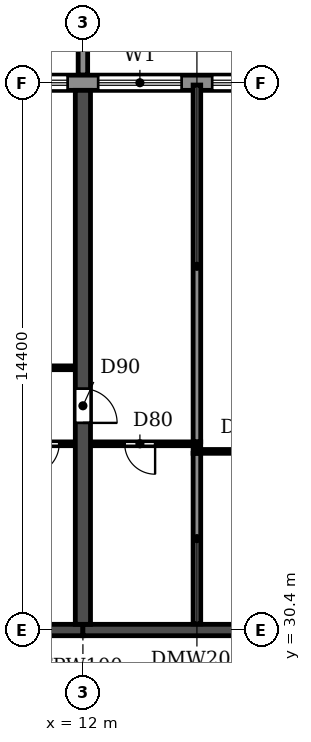
"""IFC4 building model, lengths in metres.
Left out: names, types, materials, properties, quantities, classifications, styles, units other than length and angle.
Written with IfcOpenShell. Run it as: python <this file> out.ifc"""

import sys

from ifc_helpers import new_model, si_unit, direction, frame, frame_2d, origin, place, context, subcontext, project, spatial, polyline, rectangle, outline, extrude, source, transform, mapped, element, fill, save


model = new_model("IFC4")
c1 = context("Model", 3, precision=1e-05, world=origin(), true_north=direction((0.0, 1.0)))
c2 = subcontext(c1, "Body", "Model", "MODEL_VIEW")
j1 = project(units=[si_unit("LENGTHUNIT", "METRE"), si_unit("PLANEANGLEUNIT", "RADIAN")], contexts=[c1])
p1 = place(None, origin())
s1 = spatial("IfcSite", under=j1, at=p1, CompositionType="ELEMENT")
p2 = place(p1, origin())
s2 = spatial("IfcBuilding", under=s1, at=p2, CompositionType="ELEMENT")
p3 = place(p2, frame((0.0, 0.0, 49.8)))
s3 = spatial("IfcBuildingStorey", under=s2, at=p3, CompositionType="ELEMENT", Elevation=49.8)
p4 = place(p3, frame((12.0, 30.55, 0.0), z_axis=(0.0, 0.0, 1.0), x_axis=(0.0, 1.0, 0.0)))
e1 = element("IfcWall", 1, at=p4, inside=s3, PredefinedType="SHEAR", context=c2, shape_type="SweptSolid", body=[
    extrude(rectangle(XDim=14.05, YDim=0.4, at=frame_2d((7.025, 0.0))), origin(), (0.0, 0.0, 1.0), 3.0),
])
p5 = place(p4, frame((5.3, 0.0, 0.0)))
e2 = element("IfcOpeningElement", 2, at=p5, cuts=e1, PredefinedType="OPENING", context=c2, shape_type="SweptSolid", body=[
    extrude(rectangle(XDim=0.9, YDim=2.1, at=frame_2d((0.45, 1.05))), frame((0.0, 0.21, 0.0), z_axis=(0.0, -1.0, 0.0), x_axis=(1.0, 0.0, 0.0)), (0.0, 0.0, 1.0), 0.42),
])
p6 = place(p3, frame((6.0, 30.4, 0.0), z_axis=(0.0, 0.0, 1.0), x_axis=(1.0, 0.0, 0.0)))
e3 = element("IfcWall", 3, at=p6, inside=s3, PredefinedType="SHEAR", context=c2, shape_type="SweptSolid", body=[
    extrude(rectangle(XDim=6.0, YDim=0.3, at=frame_2d((3.0, 0.0))), origin(), (0.0, 0.0, 1.0), 2.4),
])
p7 = place(p6, frame((2.55, 0.0, 0.0)))
e4 = element("IfcOpeningElement", 4, at=p7, cuts=e3, PredefinedType="OPENING", context=c2, shape_type="SweptSolid", body=[
    extrude(rectangle(XDim=1.0, YDim=2.1, at=frame_2d((0.5, 1.05))), frame((0.0, 0.16, 0.0), z_axis=(0.0, -1.0, 0.0), x_axis=(1.0, 0.0, 0.0)), (0.0, 0.0, 1.0), 0.32),
])
p8 = place(p3, frame((12.0, 30.4, 0.0), z_axis=(0.0, 0.0, 1.0), x_axis=(1.0, 0.0, 0.0)))
e5 = element("IfcWall", 5, at=p8, inside=s3, PredefinedType="SHEAR", context=c2, shape_type="SweptSolid", body=[
    extrude(rectangle(XDim=6.0, YDim=0.3, at=frame_2d((3.0, 0.0))), origin(), (0.0, 0.0, 1.0), 2.4),
])
p9 = place(p3, frame((97.317, 44.8, 0.0), z_axis=(0.0, 0.0, 1.0), x_axis=(-1.0, 0.0, 0.0)))
e6 = element("IfcWall", 6, at=p9, inside=s3, PredefinedType="STANDARD", context=c2, shape_type="SweptSolid", body=[
    extrude(rectangle(XDim=92.634, YDim=0.4, at=frame_2d((46.317, 0.0))), origin(), (0.0, 0.0, 1.0), 3.0),
])
p10 = place(p9, frame((88.917, 0.0, 0.0)))
e7 = element("IfcOpeningElement", 7, at=p10, cuts=e6, PredefinedType="OPENING", context=c2, shape_type="SweptSolid", body=[
    extrude(rectangle(XDim=1.8, YDim=2.4, at=frame_2d((0.9, 1.2))), frame((0.0, 0.21, 0.0), z_axis=(0.0, -1.0, 0.0), x_axis=(1.0, 0.0, 0.0)), (0.0, 0.0, 1.0), 0.42),
])
p11 = place(p9, frame((85.717, 0.0, 0.9)))
e8 = element("IfcOpeningElement", 8, at=p11, cuts=e6, PredefinedType="OPENING", context=c2, shape_type="SweptSolid", body=[
    extrude(rectangle(XDim=2.2, YDim=1.5, at=frame_2d((1.1, 0.75))), frame((0.0, 0.21, 0.0), z_axis=(0.0, -1.0, 0.0), x_axis=(1.0, 0.0, 0.0)), (0.0, 0.0, 1.0), 0.42),
])
p12 = place(p9, frame((82.717, 0.0, 0.9)))
e9 = element("IfcOpeningElement", 9, at=p12, cuts=e6, PredefinedType="OPENING", context=c2, shape_type="SweptSolid", body=[
    extrude(rectangle(XDim=2.2, YDim=1.5, at=frame_2d((1.1, 0.75))), frame((0.0, 0.21, 0.0), z_axis=(0.0, -1.0, 0.0), x_axis=(1.0, 0.0, 0.0)), (0.0, 0.0, 1.0), 0.42),
])
p13 = place(p9, frame((79.717, 0.0, 0.9)))
e10 = element("IfcOpeningElement", 10, at=p13, cuts=e6, PredefinedType="OPENING", context=c2, shape_type="SweptSolid", body=[
    extrude(rectangle(XDim=2.2, YDim=1.5, at=frame_2d((1.1, 0.75))), frame((0.0, 0.21, 0.0), z_axis=(0.0, -1.0, 0.0), x_axis=(1.0, 0.0, 0.0)), (0.0, 0.0, 1.0), 0.42),
])
p14 = place(p9, frame((76.717, 0.0, 0.9)))
e11 = element("IfcOpeningElement", 11, at=p14, cuts=e6, PredefinedType="OPENING", context=c2, shape_type="SweptSolid", body=[
    extrude(rectangle(XDim=2.2, YDim=1.5, at=frame_2d((1.1, 0.75))), frame((0.0, 0.21, 0.0), z_axis=(0.0, -1.0, 0.0), x_axis=(1.0, 0.0, 0.0)), (0.0, 0.0, 1.0), 0.42),
])
p15 = place(p9, frame((73.917, 0.0, 0.0)))
e12 = element("IfcOpeningElement", 12, at=p15, cuts=e6, PredefinedType="OPENING", context=c2, shape_type="SweptSolid", body=[
    extrude(rectangle(XDim=1.8, YDim=2.4, at=frame_2d((0.9, 1.2))), frame((0.0, 0.21, 0.0), z_axis=(0.0, -1.0, 0.0), x_axis=(1.0, 0.0, 0.0)), (0.0, 0.0, 1.0), 0.42),
])
p16 = place(p9, frame((70.717, 0.0, 0.9)))
e13 = element("IfcOpeningElement", 13, at=p16, cuts=e6, PredefinedType="OPENING", context=c2, shape_type="SweptSolid", body=[
    extrude(rectangle(XDim=2.2, YDim=1.5, at=frame_2d((1.1, 0.75))), frame((0.0, 0.21, 0.0), z_axis=(0.0, -1.0, 0.0), x_axis=(1.0, 0.0, 0.0)), (0.0, 0.0, 1.0), 0.42),
])
p17 = place(p9, frame((67.717, 0.0, 0.9)))
e14 = element("IfcOpeningElement", 14, at=p17, cuts=e6, PredefinedType="OPENING", context=c2, shape_type="SweptSolid", body=[
    extrude(rectangle(XDim=2.2, YDim=1.5, at=frame_2d((1.1, 0.75))), frame((0.0, 0.21, 0.0), z_axis=(0.0, -1.0, 0.0), x_axis=(1.0, 0.0, 0.0)), (0.0, 0.0, 1.0), 0.42),
])
p18 = place(p9, frame((64.717, 0.0, 0.9)))
e15 = element("IfcOpeningElement", 15, at=p18, cuts=e6, PredefinedType="OPENING", context=c2, shape_type="SweptSolid", body=[
    extrude(rectangle(XDim=2.2, YDim=1.5, at=frame_2d((1.1, 0.75))), frame((0.0, 0.21, 0.0), z_axis=(0.0, -1.0, 0.0), x_axis=(1.0, 0.0, 0.0)), (0.0, 0.0, 1.0), 0.42),
])
p19 = place(p9, frame((61.917, 0.0, 0.0)))
e16 = element("IfcOpeningElement", 16, at=p19, cuts=e6, PredefinedType="OPENING", context=c2, shape_type="SweptSolid", body=[
    extrude(rectangle(XDim=1.8, YDim=2.4, at=frame_2d((0.9, 1.2))), frame((0.0, 0.21, 0.0), z_axis=(0.0, -1.0, 0.0), x_axis=(1.0, 0.0, 0.0)), (0.0, 0.0, 1.0), 0.42),
])
p20 = place(p9, frame((58.717, 0.0, 0.9)))
e17 = element("IfcOpeningElement", 17, at=p20, cuts=e6, PredefinedType="OPENING", context=c2, shape_type="SweptSolid", body=[
    extrude(rectangle(XDim=2.2, YDim=1.5, at=frame_2d((1.1, 0.75))), frame((0.0, 0.21, 0.0), z_axis=(0.0, -1.0, 0.0), x_axis=(1.0, 0.0, 0.0)), (0.0, 0.0, 1.0), 0.42),
])
p21 = place(p9, frame((55.717, 0.0, 0.9)))
e18 = element("IfcOpeningElement", 18, at=p21, cuts=e6, PredefinedType="OPENING", context=c2, shape_type="SweptSolid", body=[
    extrude(rectangle(XDim=2.2, YDim=1.5, at=frame_2d((1.1, 0.75))), frame((0.0, 0.21, 0.0), z_axis=(0.0, -1.0, 0.0), x_axis=(1.0, 0.0, 0.0)), (0.0, 0.0, 1.0), 0.42),
])
p22 = place(p9, frame((52.717, 0.0, 0.9)))
e19 = element("IfcOpeningElement", 19, at=p22, cuts=e6, PredefinedType="OPENING", context=c2, shape_type="SweptSolid", body=[
    extrude(rectangle(XDim=2.2, YDim=1.5, at=frame_2d((1.1, 0.75))), frame((0.0, 0.21, 0.0), z_axis=(0.0, -1.0, 0.0), x_axis=(1.0, 0.0, 0.0)), (0.0, 0.0, 1.0), 0.42),
])
p23 = place(p9, frame((49.917, 0.0, 0.0)))
e20 = element("IfcOpeningElement", 20, at=p23, cuts=e6, PredefinedType="OPENING", context=c2, shape_type="SweptSolid", body=[
    extrude(rectangle(XDim=1.8, YDim=2.4, at=frame_2d((0.9, 1.2))), frame((0.0, 0.21, 0.0), z_axis=(0.0, -1.0, 0.0), x_axis=(1.0, 0.0, 0.0)), (0.0, 0.0, 1.0), 0.42),
])
p24 = place(p9, frame((46.717, 0.0, 0.9)))
e21 = element("IfcOpeningElement", 21, at=p24, cuts=e6, PredefinedType="OPENING", context=c2, shape_type="SweptSolid", body=[
    extrude(rectangle(XDim=2.2, YDim=1.5, at=frame_2d((1.1, 0.75))), frame((0.0, 0.21, 0.0), z_axis=(0.0, -1.0, 0.0), x_axis=(1.0, 0.0, 0.0)), (0.0, 0.0, 1.0), 0.42),
])
p25 = place(p9, frame((43.717, 0.0, 0.9)))
e22 = element("IfcOpeningElement", 22, at=p25, cuts=e6, PredefinedType="OPENING", context=c2, shape_type="SweptSolid", body=[
    extrude(rectangle(XDim=2.2, YDim=1.5, at=frame_2d((1.1, 0.75))), frame((0.0, 0.21, 0.0), z_axis=(0.0, -1.0, 0.0), x_axis=(1.0, 0.0, 0.0)), (0.0, 0.0, 1.0), 0.42),
])
p26 = place(p9, frame((40.717, 0.0, 0.9)))
e23 = element("IfcOpeningElement", 23, at=p26, cuts=e6, PredefinedType="OPENING", context=c2, shape_type="SweptSolid", body=[
    extrude(rectangle(XDim=2.2, YDim=1.5, at=frame_2d((1.1, 0.75))), frame((0.0, 0.21, 0.0), z_axis=(0.0, -1.0, 0.0), x_axis=(1.0, 0.0, 0.0)), (0.0, 0.0, 1.0), 0.42),
])
p27 = place(p9, frame((37.917, 0.0, 0.0)))
e24 = element("IfcOpeningElement", 24, at=p27, cuts=e6, PredefinedType="OPENING", context=c2, shape_type="SweptSolid", body=[
    extrude(rectangle(XDim=1.8, YDim=2.4, at=frame_2d((0.9, 1.2))), frame((0.0, 0.21, 0.0), z_axis=(0.0, -1.0, 0.0), x_axis=(1.0, 0.0, 0.0)), (0.0, 0.0, 1.0), 0.42),
])
p28 = place(p9, frame((34.717, 0.0, 0.9)))
e25 = element("IfcOpeningElement", 25, at=p28, cuts=e6, PredefinedType="OPENING", context=c2, shape_type="SweptSolid", body=[
    extrude(rectangle(XDim=2.2, YDim=1.5, at=frame_2d((1.1, 0.75))), frame((0.0, 0.21, 0.0), z_axis=(0.0, -1.0, 0.0), x_axis=(1.0, 0.0, 0.0)), (0.0, 0.0, 1.0), 0.42),
])
p29 = place(p9, frame((31.717, 0.0, 0.9)))
e26 = element("IfcOpeningElement", 26, at=p29, cuts=e6, PredefinedType="OPENING", context=c2, shape_type="SweptSolid", body=[
    extrude(rectangle(XDim=2.2, YDim=1.5, at=frame_2d((1.1, 0.75))), frame((0.0, 0.21, 0.0), z_axis=(0.0, -1.0, 0.0), x_axis=(1.0, 0.0, 0.0)), (0.0, 0.0, 1.0), 0.42),
])
p30 = place(p9, frame((28.717, 0.0, 0.9)))
e27 = element("IfcOpeningElement", 27, at=p30, cuts=e6, PredefinedType="OPENING", context=c2, shape_type="SweptSolid", body=[
    extrude(rectangle(XDim=2.2, YDim=1.5, at=frame_2d((1.1, 0.75))), frame((0.0, 0.21, 0.0), z_axis=(0.0, -1.0, 0.0), x_axis=(1.0, 0.0, 0.0)), (0.0, 0.0, 1.0), 0.42),
])
p31 = place(p9, frame((25.917, 0.0, 0.0)))
e28 = element("IfcOpeningElement", 28, at=p31, cuts=e6, PredefinedType="OPENING", context=c2, shape_type="SweptSolid", body=[
    extrude(rectangle(XDim=1.8, YDim=2.4, at=frame_2d((0.9, 1.2))), frame((0.0, 0.21, 0.0), z_axis=(0.0, -1.0, 0.0), x_axis=(1.0, 0.0, 0.0)), (0.0, 0.0, 1.0), 0.42),
])
p32 = place(p9, frame((22.917, 0.0, 0.0)))
e29 = element("IfcOpeningElement", 29, at=p32, cuts=e6, PredefinedType="OPENING", context=c2, shape_type="SweptSolid", body=[
    extrude(rectangle(XDim=1.8, YDim=2.4, at=frame_2d((0.9, 1.2))), frame((0.0, 0.21, 0.0), z_axis=(0.0, -1.0, 0.0), x_axis=(1.0, 0.0, 0.0)), (0.0, 0.0, 1.0), 0.42),
])
p33 = place(p9, frame((19.717, 0.0, 0.9)))
e30 = element("IfcOpeningElement", 30, at=p33, cuts=e6, PredefinedType="OPENING", context=c2, shape_type="SweptSolid", body=[
    extrude(rectangle(XDim=2.2, YDim=1.5, at=frame_2d((1.1, 0.75))), frame((0.0, 0.21, 0.0), z_axis=(0.0, -1.0, 0.0), x_axis=(1.0, 0.0, 0.0)), (0.0, 0.0, 1.0), 0.42),
])
p34 = place(p9, frame((16.717, 0.0, 0.9)))
e31 = element("IfcOpeningElement", 31, at=p34, cuts=e6, PredefinedType="OPENING", context=c2, shape_type="SweptSolid", body=[
    extrude(rectangle(XDim=2.2, YDim=1.5, at=frame_2d((1.1, 0.75))), frame((0.0, 0.21, 0.0), z_axis=(0.0, -1.0, 0.0), x_axis=(1.0, 0.0, 0.0)), (0.0, 0.0, 1.0), 0.42),
])
p35 = place(p9, frame((13.717, 0.0, 0.9)))
e32 = element("IfcOpeningElement", 32, at=p35, cuts=e6, PredefinedType="OPENING", context=c2, shape_type="SweptSolid", body=[
    extrude(rectangle(XDim=2.2, YDim=1.5, at=frame_2d((1.1, 0.75))), frame((0.0, 0.21, 0.0), z_axis=(0.0, -1.0, 0.0), x_axis=(1.0, 0.0, 0.0)), (0.0, 0.0, 1.0), 0.42),
])
p36 = place(p9, frame((10.717, 0.0, 0.9)))
e33 = element("IfcOpeningElement", 33, at=p36, cuts=e6, PredefinedType="OPENING", context=c2, shape_type="SweptSolid", body=[
    extrude(rectangle(XDim=2.2, YDim=1.5, at=frame_2d((1.1, 0.75))), frame((0.0, 0.21, 0.0), z_axis=(0.0, -1.0, 0.0), x_axis=(1.0, 0.0, 0.0)), (0.0, 0.0, 1.0), 0.42),
])
p37 = place(p9, frame((7.917, 0.0, 0.0)))
e34 = element("IfcOpeningElement", 34, at=p37, cuts=e6, PredefinedType="OPENING", context=c2, shape_type="SweptSolid", body=[
    extrude(rectangle(XDim=1.8, YDim=2.4, at=frame_2d((0.9, 1.2))), frame((0.0, 0.21, 0.0), z_axis=(0.0, -1.0, 0.0), x_axis=(1.0, 0.0, 0.0)), (0.0, 0.0, 1.0), 0.42),
])
p38 = place(p9, frame((4.717, 0.0, 0.9)))
e35 = element("IfcOpeningElement", 35, at=p38, cuts=e6, PredefinedType="OPENING", context=c2, shape_type="SweptSolid", body=[
    extrude(rectangle(XDim=2.2, YDim=1.5, at=frame_2d((1.1, 0.75))), frame((0.0, 0.21, 0.0), z_axis=(0.0, -1.0, 0.0), x_axis=(1.0, 0.0, 0.0)), (0.0, 0.0, 1.0), 0.42),
])
p39 = place(p9, frame((1.917, 0.0, 0.0)))
e36 = element("IfcOpeningElement", 36, at=p39, cuts=e6, PredefinedType="OPENING", context=c2, shape_type="SweptSolid", body=[
    extrude(rectangle(XDim=1.8, YDim=2.4, at=frame_2d((0.9, 1.2))), frame((0.0, 0.21, 0.0), z_axis=(0.0, -1.0, 0.0), x_axis=(1.0, 0.0, 0.0)), (0.0, 0.0, 1.0), 0.42),
])
m1 = source(origin(), c2, "Body", "SweptSolid", [
    extrude(outline(polyline([(0.0, 0.0), (0.25, 0.0), (0.25, 3.1), (0.0, 3.1), (0.0, 0.0)])), origin(), (0.0, 0.0, 1.0), 3.1),
])
p40 = place(p3, frame((11.875, 45.0, 0.0)))
e37 = element("IfcWall", 37, at=p40, inside=s3, PredefinedType="STANDARD", context=c2, shape_type="MappedRepresentation", body=[
    mapped(m1, transform((0.0, 0.0, 0.0))),
])
p41 = place(p3, frame((15.0, 30.56, 0.0), z_axis=(0.0, 0.0, 1.0), x_axis=(0.0, 1.0, 0.0)))
e38 = element("IfcWall", 38, at=p41, inside=s3, PredefinedType="PARTITIONING", context=c2, shape_type="SweptSolid", body=[
    extrude(rectangle(XDim=4.49, YDim=0.2, at=frame_2d((2.245, 0.0))), origin(), (0.0, 0.0, 1.0), 3.0),
])
p42 = place(p3, frame((15.0, 35.35, 0.0), z_axis=(0.0, 0.0, 1.0), x_axis=(0.0, 1.0, 0.0)))
e39 = element("IfcWall", 39, at=p42, inside=s3, PredefinedType="PARTITIONING", context=c2, shape_type="SweptSolid", body=[
    extrude(rectangle(XDim=9.39, YDim=0.2, at=frame_2d((4.695, 0.0))), origin(), (0.0, 0.0, 1.0), 3.0),
])
p43 = place(p3, frame((14.9, 35.1, 0.0), z_axis=(0.0, 0.0, 1.0), x_axis=(1.0, 0.0, 0.0)))
e40 = element("IfcWall", 40, at=p43, inside=s3, PredefinedType="PARTITIONING", context=c2, shape_type="SweptSolid", body=[
    extrude(rectangle(XDim=2.89, YDim=0.1, at=frame_2d((1.445, 0.0))), origin(), (0.0, 0.0, 1.0), 3.0),
])
p44 = place(p43, frame((1.2, 0.0, 0.0)))
e41 = element("IfcOpeningElement", 41, at=p44, cuts=e40, PredefinedType="OPENING", context=c2, shape_type="SweptSolid", body=[
    extrude(rectangle(XDim=0.8, YDim=2.1, at=frame_2d((0.4, 1.05))), frame((0.0, 0.06, 0.0), z_axis=(0.0, -1.0, 0.0), x_axis=(1.0, 0.0, 0.0)), (0.0, 0.0, 1.0), 0.12),
])
p45 = place(p3, frame((9.9, 35.3, 0.0), z_axis=(0.0, 0.0, 1.0), x_axis=(1.0, 0.0, 0.0)))
e42 = element("IfcWall", 42, at=p45, inside=s3, PredefinedType="PARTITIONING", context=c2, shape_type="SweptSolid", body=[
    extrude(rectangle(XDim=1.89, YDim=0.1, at=frame_2d((0.945, 0.0))), origin(), (0.0, 0.0, 1.0), 3.0),
])
p46 = place(p45, frame((0.675, 0.0, 0.0)))
e43 = element("IfcOpeningElement", 43, at=p46, cuts=e42, PredefinedType="OPENING", context=c2, shape_type="SweptSolid", body=[
    extrude(rectangle(XDim=0.8, YDim=2.1, at=frame_2d((0.4, 1.05))), frame((0.0, 0.06, 0.0), z_axis=(0.0, -1.0, 0.0), x_axis=(1.0, 0.0, 0.0)), (0.0, 0.0, 1.0), 0.12),
])
p47 = place(p3, frame((12.21, 35.3, 0.0), z_axis=(0.0, 0.0, 1.0), x_axis=(1.0, 0.0, 0.0)))
e44 = element("IfcWall", 44, at=p47, inside=s3, PredefinedType="PARTITIONING", context=c2, shape_type="SweptSolid", body=[
    extrude(rectangle(XDim=2.89, YDim=0.1, at=frame_2d((1.445, 0.0))), origin(), (0.0, 0.0, 1.0), 3.0),
])
p48 = place(p47, frame((0.89, 0.0, 0.0)))
e45 = element("IfcOpeningElement", 45, at=p48, cuts=e44, PredefinedType="OPENING", context=c2, shape_type="SweptSolid", body=[
    extrude(rectangle(XDim=0.8, YDim=2.1, at=frame_2d((0.4, 1.05))), frame((0.0, 0.06, 0.0), z_axis=(0.0, -1.0, 0.0), x_axis=(1.0, 0.0, 0.0)), (0.0, 0.0, 1.0), 0.12),
])
p49 = place(p3, frame((8.95, 37.3, 0.0), z_axis=(0.0, 0.0, 1.0), x_axis=(1.0, 0.0, 0.0)))
e46 = element("IfcWall", 46, at=p49, inside=s3, PredefinedType="PARTITIONING", context=c2, shape_type="SweptSolid", body=[
    extrude(rectangle(XDim=2.84, YDim=0.1, at=frame_2d((1.42, 0.0))), origin(), (0.0, 0.0, 1.0), 3.0),
])
p50 = place(p49, frame((0.55, 0.0, 0.0)))
e47 = element("IfcOpeningElement", 47, at=p50, cuts=e46, PredefinedType="OPENING", context=c2, shape_type="SweptSolid", body=[
    extrude(rectangle(XDim=0.9, YDim=2.1, at=frame_2d((0.45, 1.05))), frame((0.0, 0.06, 0.0), z_axis=(0.0, -1.0, 0.0), x_axis=(1.0, 0.0, 0.0)), (0.0, 0.0, 1.0), 0.12),
])
p51 = place(p11, origin())
e48 = element("IfcWindow", 48, at=p51, inside=s3, PartitioningType="DOUBLE_PANEL_HORIZONTAL", PredefinedType="WINDOW", context=c2, shape_type="SweptSolid", body=[
    extrude(rectangle(XDim=2.2, YDim=1.5, at=frame_2d((1.1, 0.75))), frame((0.0, 0.03, 0.0), z_axis=(0.0, -1.0, 0.0), x_axis=(1.0, 0.0, 0.0)), (0.0, 0.0, 1.0), 0.06),
])
fill(e8, e48)
p52 = place(p12, origin())
e49 = element("IfcWindow", 49, at=p52, inside=s3, PartitioningType="DOUBLE_PANEL_HORIZONTAL", PredefinedType="WINDOW", context=c2, shape_type="SweptSolid", body=[
    extrude(rectangle(XDim=2.2, YDim=1.5, at=frame_2d((1.1, 0.75))), frame((0.0, 0.03, 0.0), z_axis=(0.0, -1.0, 0.0), x_axis=(1.0, 0.0, 0.0)), (0.0, 0.0, 1.0), 0.06),
])
fill(e9, e49)
p53 = place(p13, origin())
e50 = element("IfcWindow", 50, at=p53, inside=s3, PartitioningType="DOUBLE_PANEL_HORIZONTAL", PredefinedType="WINDOW", context=c2, shape_type="SweptSolid", body=[
    extrude(rectangle(XDim=2.2, YDim=1.5, at=frame_2d((1.1, 0.75))), frame((0.0, 0.03, 0.0), z_axis=(0.0, -1.0, 0.0), x_axis=(1.0, 0.0, 0.0)), (0.0, 0.0, 1.0), 0.06),
])
fill(e10, e50)
p54 = place(p48, frame((0.8, 0.0, 0.0), z_axis=(0.0, 0.0, 1.0), x_axis=(-1.0, 0.0, 0.0)))
e51 = element("IfcDoor", 51, at=p54, inside=s3, OperationType="SINGLE_SWING_LEFT", PredefinedType="DOOR", context=c2, shape_type="SweptSolid", body=[
    extrude(rectangle(XDim=0.8, YDim=2.1, at=frame_2d((0.4, 1.05))), frame((0.0, 0.025, 0.0), z_axis=(0.0, -1.0, 0.0), x_axis=(1.0, 0.0, 0.0)), (0.0, 0.0, 1.0), 0.05),
])
fill(e45, e51)
p55 = place(p46, frame((0.8, 0.0, 0.0), z_axis=(0.0, 0.0, 1.0), x_axis=(-1.0, 0.0, 0.0)))
e52 = element("IfcDoor", 52, at=p55, inside=s3, OperationType="SINGLE_SWING_RIGHT", PredefinedType="DOOR", context=c2, shape_type="SweptSolid", body=[
    extrude(rectangle(XDim=0.8, YDim=2.1, at=frame_2d((0.4, 1.05))), frame((0.0, 0.025, 0.0), z_axis=(0.0, -1.0, 0.0), x_axis=(1.0, 0.0, 0.0)), (0.0, 0.0, 1.0), 0.05),
])
fill(e43, e52)
p56 = place(p5, frame((0.9, 0.0, 0.0), z_axis=(0.0, 0.0, 1.0), x_axis=(-1.0, 0.0, 0.0)))
e53 = element("IfcDoor", 53, at=p56, inside=s3, OperationType="SINGLE_SWING_RIGHT", PredefinedType="DOOR", context=c2, shape_type="SweptSolid", body=[
    extrude(rectangle(XDim=0.9, YDim=2.1, at=frame_2d((0.45, 1.05))), frame((0.0, 0.025, 0.0), z_axis=(0.0, -1.0, 0.0), x_axis=(1.0, 0.0, 0.0)), (0.0, 0.0, 1.0), 0.05),
])
fill(e2, e53)
save(model, sys.argv[1])
